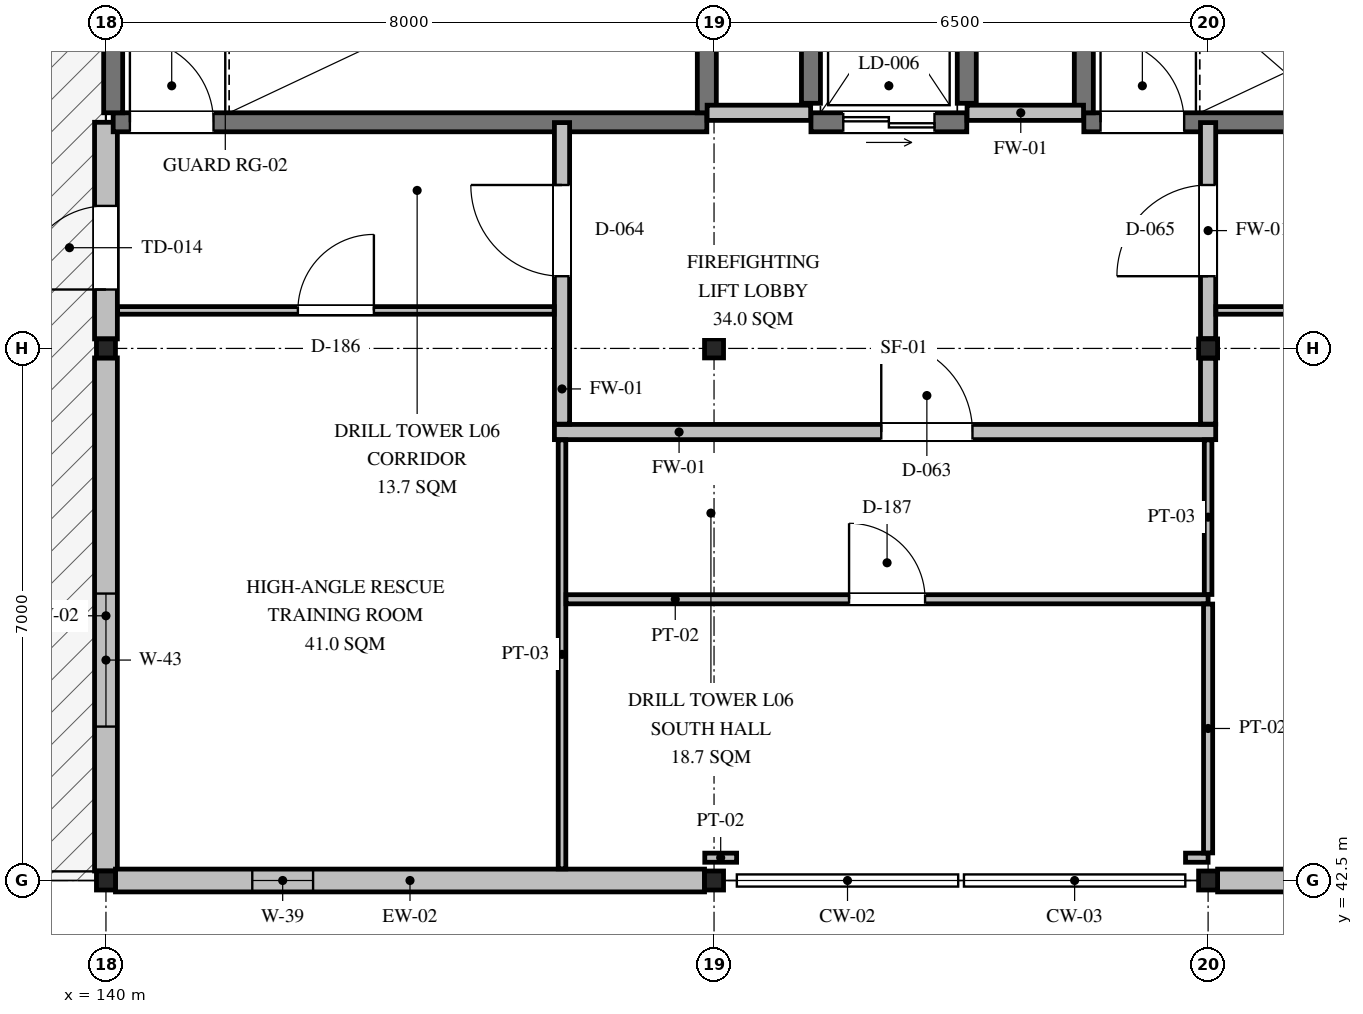
"""IFC4 building model, lengths in metres.
Left out: names, types, materials, properties, quantities, classifications, styles, units other than length and angle.
Written with IfcOpenShell. Run it as: python <this file> out.ifc"""

import sys

from ifc_helpers import new_model, si_unit, direction, frame, frame_2d, origin, origin_2d, place, context, subcontext, project, spatial, rectangle, i_section, extrude, element, fill, save


model = new_model("IFC4")
c1 = context("Model", 3, precision=1e-05, world=origin(), true_north=direction((0.0, 1.0)))
c2 = subcontext(c1, "Body", "Model", "MODEL_VIEW")
j1 = project(units=[si_unit("LENGTHUNIT", "METRE"), si_unit("PLANEANGLEUNIT", "RADIAN")], contexts=[c1])
p1 = place(None, origin())
s1 = spatial("IfcSite", under=j1, at=p1, CompositionType="ELEMENT")
p2 = place(p1, origin())
s2 = spatial("IfcBuilding", under=s1, at=p2, CompositionType="ELEMENT")
p3 = place(p2, frame((0.0, 0.0, 22.65)))
s3 = spatial("IfcBuildingStorey", under=s2, at=p3, CompositionType="ELEMENT", Elevation=22.65)
for number, where, z_axis, x_axis in (
    (1, (140.0, 42.5, 0.0), (0.0, 0.0, 1.0), (1.0, 0.0, 0.0)),
    (2, (140.0, 49.5, 0.0), (0.0, 0.0, 1.0), (1.0, 0.0, 0.0)),
    (3, (148.0, 42.5, 0.0), (0.0, 0.0, 1.0), (1.0, 0.0, 0.0)),
    (4, (148.0, 49.5, 0.0), (0.0, 0.0, 1.0), (1.0, 0.0, 0.0)),
    (5, (154.5, 42.5, 0.0), (0.0, 0.0, 1.0), (1.0, 0.0, 0.0)),
    (6, (154.5, 49.5, 0.0), (0.0, 0.0, 1.0), (1.0, 0.0, 0.0)),
):
    element("IfcColumn", number, at=place(p3, frame(where, z_axis=z_axis, x_axis=x_axis)), inside=s3, PredefinedType="COLUMN", context=c2, shape_type="SweptSolid", body=[
        extrude(i_section(OverallWidth=0.25, OverallDepth=0.25, WebThickness=0.009, FlangeThickness=0.014, FilletRadius=0.016, at=origin_2d()), origin(), (0.0, 0.0, 1.0), 4.2),
    ])
p4 = place(p3, frame((140.0, 42.625, 0.0), z_axis=(0.0, 0.0, 1.0), x_axis=(0.0, 1.0, 0.0)))
e7 = element("IfcWall", 7, at=p4, inside=s3, PredefinedType="SOLIDWALL", context=c2, shape_type="SweptSolid", body=[
    extrude(rectangle(XDim=6.75, YDim=0.3, at=frame_2d((3.375, 0.0))), origin(), (0.0, 0.0, 1.0), 3.584),
])
p5 = place(p4, frame((1.9, 0.0, 0.85)))
e8 = element("IfcOpeningElement", 8, at=p5, cuts=e7, PredefinedType="OPENING", context=c2, shape_type="SweptSolid", body=[
    extrude(rectangle(XDim=1.75, YDim=1.3, at=frame_2d((0.875, 0.65))), frame((0.0, 0.16, 0.0), z_axis=(0.0, -1.0, 0.0), x_axis=(1.0, 0.0, 0.0)), (0.0, 0.0, 1.0), 0.32),
])
p6 = place(p3, frame((140.0, 49.625, 0.0), z_axis=(0.0, 0.0, 1.0), x_axis=(0.0, 1.0, 0.0)))
e9 = element("IfcWall", 9, at=p6, inside=s3, PredefinedType="SOLIDWALL", context=c2, shape_type="SweptSolid", body=[
    extrude(rectangle(XDim=2.85, YDim=0.3, at=frame_2d((1.425, 0.0))), origin(), (0.0, 0.0, 1.0), 3.98),
])
p7 = place(p6, frame((0.65, 0.0, 0.0)))
e10 = element("IfcOpeningElement", 10, at=p7, cuts=e9, PredefinedType="OPENING", context=c2, shape_type="SweptSolid", body=[
    extrude(rectangle(XDim=1.1, YDim=2.2, at=frame_2d((0.55, 1.1))), frame((0.0, 0.16, 0.0), z_axis=(0.0, -1.0, 0.0), x_axis=(1.0, 0.0, 0.0)), (0.0, 0.0, 1.0), 0.32),
])
p8 = place(p3, frame((140.125, 42.5, 0.0), z_axis=(0.0, 0.0, 1.0), x_axis=(1.0, 0.0, 0.0)))
e11 = element("IfcWall", 11, at=p8, inside=s3, PredefinedType="SOLIDWALL", context=c2, shape_type="SweptSolid", body=[
    extrude(rectangle(XDim=7.75, YDim=0.3, at=frame_2d((3.875, 0.0))), origin(), (0.0, 0.0, 1.0), 3.386),
])
p9 = place(p8, frame((1.8, 0.0, 0.9)))
e12 = element("IfcOpeningElement", 12, at=p9, cuts=e11, PredefinedType="OPENING", context=c2, shape_type="SweptSolid", body=[
    extrude(rectangle(XDim=0.8, YDim=1.3, at=frame_2d((0.4, 0.65))), frame((0.0, 0.16, 0.0), z_axis=(0.0, -1.0, 0.0), x_axis=(1.0, 0.0, 0.0)), (0.0, 0.0, 1.0), 0.32),
])
p10 = place(p3, frame((154.625, 42.5, 0.0), z_axis=(0.0, 0.0, 1.0), x_axis=(1.0, 0.0, 0.0)))
e13 = element("IfcWall", 13, at=p10, inside=s3, PredefinedType="SOLIDWALL", context=c2, shape_type="SweptSolid", body=[
    extrude(rectangle(XDim=6.25, YDim=0.3, at=frame_2d((3.125, 0.0))), origin(), (0.0, 0.0, 1.0), 3.374),
])
p11 = place(p10, frame((1.8, 0.0, 0.9)))
e14 = element("IfcOpeningElement", 14, at=p11, cuts=e13, PredefinedType="OPENING", context=c2, shape_type="SweptSolid", body=[
    extrude(rectangle(XDim=1.3, YDim=1.3, at=frame_2d((0.65, 0.65))), frame((0.0, 0.16, 0.0), z_axis=(0.0, -1.0, 0.0), x_axis=(1.0, 0.0, 0.0)), (0.0, 0.0, 1.0), 0.32),
])
p12 = place(p3, frame((140.095, 52.475, 0.0), z_axis=(0.0, 0.0, 1.0), x_axis=(1.0, 0.0, 0.0)))
e15 = element("IfcWall", 15, at=p12, inside=s3, PredefinedType="SHEAR", context=c2, shape_type="SweptSolid", body=[
    extrude(rectangle(XDim=7.81, YDim=0.25, at=frame_2d((3.905, 0.0))), origin(), (0.0, 0.0, 1.0), 3.98),
])
p13 = place(p12, frame((0.22, 0.0, 0.0)))
e16 = element("IfcOpeningElement", 16, at=p13, cuts=e15, PredefinedType="OPENING", context=c2, shape_type="SweptSolid", body=[
    extrude(rectangle(XDim=1.1, YDim=2.15, at=frame_2d((0.55, 1.075))), frame((0.0, 0.135, 0.0), z_axis=(0.0, -1.0, 0.0), x_axis=(1.0, 0.0, 0.0)), (0.0, 0.0, 1.0), 0.27),
])
for number, where, z_axis, x_axis in (
    (17, (140.095, 52.6, 0.0), (0.0, 0.0, 1.0), (0.0, 1.0, 0.0)),
    (18, (147.905, 52.6, 0.0), (0.0, 0.0, 1.0), (0.0, 1.0, 0.0)),
):
    element("IfcWall", number, at=place(p3, frame(where, z_axis=z_axis, x_axis=x_axis)), inside=s3, PredefinedType="SHEAR", context=c2, shape_type="SweptSolid", body=[
        extrude(rectangle(XDim=2.9, YDim=0.25, at=frame_2d((1.45, 0.0))), origin(), (0.0, 0.0, 1.0), 3.98),
    ])
p14 = place(p3, frame((152.865, 52.475, 0.0), z_axis=(0.0, 0.0, 1.0), x_axis=(1.0, 0.0, 0.0)))
e19 = element("IfcWall", 19, at=p14, inside=s3, PredefinedType="SHEAR", context=c2, shape_type="SweptSolid", body=[
    extrude(rectangle(XDim=7.935, YDim=0.25, at=frame_2d((3.968, 0.0))), origin(), (0.0, 0.0, 1.0), 3.98),
])
p15 = place(p14, frame((0.22, 0.0, 0.0)))
e20 = element("IfcOpeningElement", 20, at=p15, cuts=e19, PredefinedType="OPENING", context=c2, shape_type="SweptSolid", body=[
    extrude(rectangle(XDim=1.1, YDim=2.15, at=frame_2d((0.55, 1.075))), frame((0.0, 0.135, 0.0), z_axis=(0.0, -1.0, 0.0), x_axis=(1.0, 0.0, 0.0)), (0.0, 0.0, 1.0), 0.27),
])
p16 = place(p3, frame((152.865, 52.6, 0.0), z_axis=(0.0, 0.0, 1.0), x_axis=(0.0, 1.0, 0.0)))
e21 = element("IfcWall", 21, at=p16, inside=s3, PredefinedType="SHEAR", context=c2, shape_type="SweptSolid", body=[
    extrude(rectangle(XDim=2.9, YDim=0.25, at=frame_2d((1.45, 0.0))), origin(), (0.0, 0.0, 1.0), 3.98),
])
p17 = place(p3, frame((149.275, 52.475, 0.0), z_axis=(0.0, 0.0, 1.0), x_axis=(1.0, 0.0, 0.0)))
e22 = element("IfcWall", 22, at=p17, inside=s3, PredefinedType="SHEAR", context=c2, shape_type="SweptSolid", body=[
    extrude(rectangle(XDim=2.05, YDim=0.25, at=frame_2d((1.025, 0.0))), origin(), (0.0, 0.0, 1.0), 3.98),
])
p18 = place(p17, frame((0.425, 0.0, 0.0)))
e23 = element("IfcOpeningElement", 23, at=p18, cuts=e22, PredefinedType="OPENING", context=c2, shape_type="SweptSolid", body=[
    extrude(rectangle(XDim=1.2, YDim=2.15, at=frame_2d((0.6, 1.075))), frame((0.0, 0.135, 0.0), z_axis=(0.0, -1.0, 0.0), x_axis=(1.0, 0.0, 0.0)), (0.0, 0.0, 1.0), 0.27),
])
for number, where, z_axis, x_axis in (
    (24, (149.275, 52.725, 0.0), (0.0, 0.0, 1.0), (0.0, 1.0, 0.0)),
    (25, (151.325, 52.725, 0.0), (0.0, 0.0, 1.0), (0.0, 1.0, 0.0)),
):
    element("IfcWall", number, at=place(p3, frame(where, z_axis=z_axis, x_axis=x_axis)), inside=s3, PredefinedType="SHEAR", context=c2, shape_type="SweptSolid", body=[
        extrude(rectangle(XDim=2.35, YDim=0.25, at=frame_2d((1.175, 0.0))), origin(), (0.0, 0.0, 1.0), 3.98),
    ])
p19 = place(p3, frame((147.909, 52.6, 0.0), z_axis=(0.0, 0.0, 1.0), x_axis=(1.0, 0.0, 0.0)))
e26 = element("IfcWall", 26, at=p19, inside=s3, PredefinedType="PARTITIONING", context=c2, shape_type="SweptSolid", body=[
    extrude(rectangle(XDim=1.362, YDim=0.2, at=frame_2d((0.681, 0.0))), origin(), (0.0, 0.0, 1.0), 3.98),
])
p20 = place(p3, frame((151.329, 52.6, 0.0), z_axis=(0.0, 0.0, 1.0), x_axis=(1.0, 0.0, 0.0)))
e27 = element("IfcWall", 27, at=p20, inside=s3, PredefinedType="PARTITIONING", context=c2, shape_type="SweptSolid", body=[
    extrude(rectangle(XDim=1.532, YDim=0.2, at=frame_2d((0.766, 0.0))), origin(), (0.0, 0.0, 1.0), 3.98),
])
p21 = place(p3, frame((145.9, 48.4, 0.0), z_axis=(0.0, 0.0, 1.0), x_axis=(1.0, 0.0, 0.0)))
e28 = element("IfcWall", 28, at=p21, inside=s3, PredefinedType="PARTITIONING", context=c2, shape_type="SweptSolid", body=[
    extrude(rectangle(XDim=8.7, YDim=0.2, at=frame_2d((4.35, 0.0))), origin(), (0.0, 0.0, 1.0), 3.98),
])
p22 = place(p21, frame((4.3, 0.0, 0.0)))
e29 = element("IfcOpeningElement", 29, at=p22, cuts=e28, PredefinedType="OPENING", context=c2, shape_type="SweptSolid", body=[
    extrude(rectangle(XDim=1.2, YDim=2.15, at=frame_2d((0.6, 1.075))), frame((0.0, 0.11, 0.0), z_axis=(0.0, -1.0, 0.0), x_axis=(1.0, 0.0, 0.0)), (0.0, 0.0, 1.0), 0.22),
])
p23 = place(p3, frame((146.0, 48.504, 0.0), z_axis=(0.0, 0.0, 1.0), x_axis=(0.0, 1.0, 0.0)))
e30 = element("IfcWall", 30, at=p23, inside=s3, PredefinedType="PARTITIONING", context=c2, shape_type="SweptSolid", body=[
    extrude(rectangle(XDim=3.967, YDim=0.2, at=frame_2d((1.983, 0.0))), origin(), (0.0, 0.0, 1.0), 3.98),
])
p24 = place(p23, frame((1.946, 0.0, 0.0)))
e31 = element("IfcOpeningElement", 31, at=p24, cuts=e30, PredefinedType="OPENING", context=c2, shape_type="SweptSolid", body=[
    extrude(rectangle(XDim=1.2, YDim=2.15, at=frame_2d((0.6, 1.075))), frame((0.0, 0.11, 0.0), z_axis=(0.0, -1.0, 0.0), x_axis=(1.0, 0.0, 0.0)), (0.0, 0.0, 1.0), 0.22),
])
p25 = place(p3, frame((154.5, 48.504, 0.0), z_axis=(0.0, 0.0, 1.0), x_axis=(0.0, 1.0, 0.0)))
e32 = element("IfcWall", 32, at=p25, inside=s3, PredefinedType="PARTITIONING", context=c2, shape_type="SweptSolid", body=[
    extrude(rectangle(XDim=0.867, YDim=0.2, at=frame_2d((0.434, 0.0))), origin(), (0.0, 0.0, 1.0), 3.274),
])
p26 = place(p3, frame((154.5, 49.629, 0.0), z_axis=(0.0, 0.0, 1.0), x_axis=(0.0, 1.0, 0.0)))
e33 = element("IfcWall", 33, at=p26, inside=s3, PredefinedType="PARTITIONING", context=c2, shape_type="SweptSolid", body=[
    extrude(rectangle(XDim=2.842, YDim=0.2, at=frame_2d((1.421, 0.0))), origin(), (0.0, 0.0, 1.0), 3.98),
])
p27 = place(p26, frame((0.821, 0.0, 0.0)))
e34 = element("IfcOpeningElement", 34, at=p27, cuts=e33, PredefinedType="OPENING", context=c2, shape_type="SweptSolid", body=[
    extrude(rectangle(XDim=1.2, YDim=2.15, at=frame_2d((0.6, 1.075))), frame((0.0, 0.11, 0.0), z_axis=(0.0, -1.0, 0.0), x_axis=(1.0, 0.0, 0.0)), (0.0, 0.0, 1.0), 0.22),
])
p28 = place(p3, frame((140.153, 50.0, 0.0), z_axis=(0.0, 0.0, 1.0), x_axis=(1.0, 0.0, 0.0)))
e35 = element("IfcWall", 35, at=p28, inside=s3, PredefinedType="PARTITIONING", context=c2, shape_type="SweptSolid", body=[
    extrude(rectangle(XDim=5.744, YDim=0.1, at=frame_2d((2.872, 0.0))), origin(), (0.0, 0.0, 1.0), 3.98),
])
p29 = place(p28, frame((2.372, 0.0, 0.0)))
e36 = element("IfcOpeningElement", 36, at=p29, cuts=e35, PredefinedType="OPENING", context=c2, shape_type="SweptSolid", body=[
    extrude(rectangle(XDim=1.0, YDim=2.1, at=frame_2d((0.5, 1.05))), frame((0.0, 0.06, 0.0), z_axis=(0.0, -1.0, 0.0), x_axis=(1.0, 0.0, 0.0)), (0.0, 0.0, 1.0), 0.12),
])
p30 = place(p3, frame((146.0, 42.653, 0.0), z_axis=(0.0, 0.0, 1.0), x_axis=(0.0, 1.0, 0.0)))
e37 = element("IfcWall", 37, at=p30, inside=s3, PredefinedType="PARTITIONING", context=c2, shape_type="SweptSolid", body=[
    extrude(rectangle(XDim=5.644, YDim=0.1, at=frame_2d((2.822, 0.0))), origin(), (0.0, 0.0, 1.0), 3.98),
])
p31 = place(p3, frame((147.878, 42.8, 0.0), z_axis=(0.0, 0.0, 1.0), x_axis=(1.0, 0.0, 0.0)))
e38 = element("IfcWall", 38, at=p31, inside=s3, PredefinedType="PARTITIONING", context=c2, shape_type="SweptSolid", body=[
    extrude(rectangle(XDim=0.419, YDim=0.12, at=frame_2d((0.209, 0.0))), origin(), (0.0, 0.0, 1.0), 3.98),
])
p32 = place(p3, frame((154.203, 42.8, 0.0), z_axis=(0.0, 0.0, 1.0), x_axis=(1.0, 0.0, 0.0)))
e39 = element("IfcWall", 39, at=p32, inside=s3, PredefinedType="PARTITIONING", context=c2, shape_type="SweptSolid", body=[
    extrude(rectangle(XDim=0.297, YDim=0.12, at=frame_2d((0.148, 0.0))), origin(), (0.0, 0.0, 1.0), 3.98),
])
p33 = place(p3, frame((146.053, 46.2, 0.0), z_axis=(0.0, 0.0, 1.0), x_axis=(1.0, 0.0, 0.0)))
e40 = element("IfcWall", 40, at=p33, inside=s3, PredefinedType="PARTITIONING", context=c2, shape_type="SweptSolid", body=[
    extrude(rectangle(XDim=8.447, YDim=0.12, at=frame_2d((4.224, 0.0))), origin(), (0.0, 0.0, 1.0), 3.98),
])
p34 = place(p33, frame((3.723, 0.0, 0.0)))
e41 = element("IfcOpeningElement", 41, at=p34, cuts=e40, PredefinedType="OPENING", context=c2, shape_type="SweptSolid", body=[
    extrude(rectangle(XDim=1.0, YDim=2.1, at=frame_2d((0.5, 1.05))), frame((0.0, 0.07, 0.0), z_axis=(0.0, -1.0, 0.0), x_axis=(1.0, 0.0, 0.0)), (0.0, 0.0, 1.0), 0.14),
])
p35 = place(p3, frame((154.5, 42.863, 0.0), z_axis=(0.0, 0.0, 1.0), x_axis=(0.0, 1.0, 0.0)))
e42 = element("IfcWall", 42, at=p35, inside=s3, PredefinedType="PARTITIONING", context=c2, shape_type="SweptSolid", body=[
    extrude(rectangle(XDim=3.274, YDim=0.12, at=frame_2d((1.637, 0.0))), origin(), (0.0, 0.0, 1.0), 3.274),
])
p36 = place(p3, frame((154.603, 50.0, 0.0), z_axis=(0.0, 0.0, 1.0), x_axis=(1.0, 0.0, 0.0)))
e43 = element("IfcWall", 43, at=p36, inside=s3, PredefinedType="PARTITIONING", context=c2, shape_type="SweptSolid", body=[
    extrude(rectangle(XDim=6.194, YDim=0.1, at=frame_2d((3.097, 0.0))), origin(), (0.0, 0.0, 1.0), 3.98),
])
p37 = place(p36, frame((2.597, 0.0, 0.0)))
e44 = element("IfcOpeningElement", 44, at=p37, cuts=e43, PredefinedType="OPENING", context=c2, shape_type="SweptSolid", body=[
    extrude(rectangle(XDim=1.0, YDim=2.1, at=frame_2d((0.5, 1.05))), frame((0.0, 0.06, 0.0), z_axis=(0.0, -1.0, 0.0), x_axis=(1.0, 0.0, 0.0)), (0.0, 0.0, 1.0), 0.12),
])
p38 = place(p3, frame((154.5, 46.263, 0.0), z_axis=(0.0, 0.0, 1.0), x_axis=(0.0, 1.0, 0.0)))
e45 = element("IfcWall", 45, at=p38, inside=s3, PredefinedType="PARTITIONING", context=c2, shape_type="SweptSolid", body=[
    extrude(rectangle(XDim=2.034, YDim=0.1, at=frame_2d((1.017, 0.0))), origin(), (0.0, 0.0, 1.0), 3.274),
])
p39 = place(p5, origin())
e46 = element("IfcWindow", 46, at=p39, inside=s3, PartitioningType="SINGLE_PANEL", PredefinedType="WINDOW", context=c2, shape_type="SweptSolid", body=[
    extrude(rectangle(XDim=1.75, YDim=1.3, at=frame_2d((0.875, 0.65))), frame((0.0, 0.03, 0.0), z_axis=(0.0, -1.0, 0.0), x_axis=(1.0, 0.0, 0.0)), (0.0, 0.0, 1.0), 0.06),
])
fill(e8, e46)
p40 = place(p7, origin())
e47 = element("IfcDoor", 47, at=p40, inside=s3, OperationType="SINGLE_SWING_LEFT", PredefinedType="DOOR", context=c2, shape_type="SweptSolid", body=[
    extrude(rectangle(XDim=1.1, YDim=2.2, at=frame_2d((0.55, 1.1))), frame((0.0, 0.025, 0.0), z_axis=(0.0, -1.0, 0.0), x_axis=(1.0, 0.0, 0.0)), (0.0, 0.0, 1.0), 0.05),
])
fill(e10, e47)
p41 = place(p9, origin())
e48 = element("IfcWindow", 48, at=p41, inside=s3, PartitioningType="SINGLE_PANEL", PredefinedType="WINDOW", context=c2, shape_type="SweptSolid", body=[
    extrude(rectangle(XDim=0.8, YDim=1.3, at=frame_2d((0.4, 0.65))), frame((0.0, 0.03, 0.0), z_axis=(0.0, -1.0, 0.0), x_axis=(1.0, 0.0, 0.0)), (0.0, 0.0, 1.0), 0.06),
])
fill(e12, e48)
p42 = place(p13, frame((1.1, 0.0, 0.0), z_axis=(0.0, 0.0, 1.0), x_axis=(-1.0, 0.0, 0.0)))
e49 = element("IfcDoor", 49, at=p42, inside=s3, OperationType="SINGLE_SWING_LEFT", PredefinedType="DOOR", context=c2, shape_type="SweptSolid", body=[
    extrude(rectangle(XDim=1.1, YDim=2.15, at=frame_2d((0.55, 1.075))), frame((0.0, 0.025, 0.0), z_axis=(0.0, -1.0, 0.0), x_axis=(1.0, 0.0, 0.0)), (0.0, 0.0, 1.0), 0.05),
])
fill(e16, e49)
p43 = place(p15, frame((1.1, 0.0, 0.0), z_axis=(0.0, 0.0, 1.0), x_axis=(-1.0, 0.0, 0.0)))
e50 = element("IfcDoor", 50, at=p43, inside=s3, OperationType="SINGLE_SWING_LEFT", PredefinedType="DOOR", context=c2, shape_type="SweptSolid", body=[
    extrude(rectangle(XDim=1.1, YDim=2.15, at=frame_2d((0.55, 1.075))), frame((0.0, 0.025, 0.0), z_axis=(0.0, -1.0, 0.0), x_axis=(1.0, 0.0, 0.0)), (0.0, 0.0, 1.0), 0.05),
])
fill(e20, e50)
p44 = place(p18, origin())
e51 = element("IfcDoor", 51, at=p44, inside=s3, OperationType="DOUBLE_DOOR_SLIDING", PredefinedType="DOOR", context=c2, shape_type="SweptSolid", body=[
    extrude(rectangle(XDim=1.2, YDim=2.15, at=frame_2d((0.6, 1.075))), frame((0.0, 0.025, 0.0), z_axis=(0.0, -1.0, 0.0), x_axis=(1.0, 0.0, 0.0)), (0.0, 0.0, 1.0), 0.05),
])
fill(e23, e51)
p45 = place(p22, origin())
e52 = element("IfcDoor", 52, at=p45, inside=s3, OperationType="SINGLE_SWING_LEFT", PredefinedType="DOOR", context=c2, shape_type="SweptSolid", body=[
    extrude(rectangle(XDim=1.2, YDim=2.15, at=frame_2d((0.6, 1.075))), frame((0.0, 0.025, 0.0), z_axis=(0.0, -1.0, 0.0), x_axis=(1.0, 0.0, 0.0)), (0.0, 0.0, 1.0), 0.05),
])
fill(e29, e52)
p46 = place(p24, origin())
e53 = element("IfcDoor", 53, at=p46, inside=s3, OperationType="SINGLE_SWING_RIGHT", PredefinedType="DOOR", context=c2, shape_type="SweptSolid", body=[
    extrude(rectangle(XDim=1.2, YDim=2.15, at=frame_2d((0.6, 1.075))), frame((0.0, 0.025, 0.0), z_axis=(0.0, -1.0, 0.0), x_axis=(1.0, 0.0, 0.0)), (0.0, 0.0, 1.0), 0.05),
])
fill(e31, e53)
p47 = place(p27, origin())
e54 = element("IfcDoor", 54, at=p47, inside=s3, OperationType="SINGLE_SWING_LEFT", PredefinedType="DOOR", context=c2, shape_type="SweptSolid", body=[
    extrude(rectangle(XDim=1.2, YDim=2.15, at=frame_2d((0.6, 1.075))), frame((0.0, 0.025, 0.0), z_axis=(0.0, -1.0, 0.0), x_axis=(1.0, 0.0, 0.0)), (0.0, 0.0, 1.0), 0.05),
])
fill(e34, e54)
p48 = place(p29, origin())
e55 = element("IfcDoor", 55, at=p48, inside=s3, OperationType="SINGLE_SWING_RIGHT", PredefinedType="DOOR", context=c2, shape_type="SweptSolid", body=[
    extrude(rectangle(XDim=1.0, YDim=2.1, at=frame_2d((0.5, 1.05))), frame((0.0, 0.025, 0.0), z_axis=(0.0, -1.0, 0.0), x_axis=(1.0, 0.0, 0.0)), (0.0, 0.0, 1.0), 0.05),
])
fill(e36, e55)
p49 = place(p34, origin())
e56 = element("IfcDoor", 56, at=p49, inside=s3, OperationType="SINGLE_SWING_LEFT", PredefinedType="DOOR", context=c2, shape_type="SweptSolid", body=[
    extrude(rectangle(XDim=1.0, YDim=2.1, at=frame_2d((0.5, 1.05))), frame((0.0, 0.025, 0.0), z_axis=(0.0, -1.0, 0.0), x_axis=(1.0, 0.0, 0.0)), (0.0, 0.0, 1.0), 0.05),
])
fill(e41, e56)
save(model, sys.argv[1])
